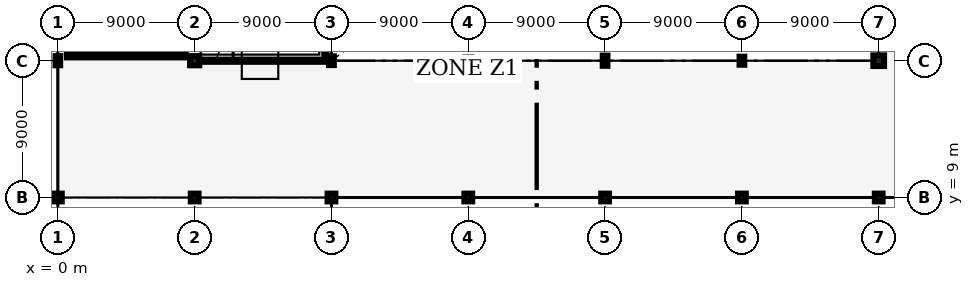
"""IFC4 building model, lengths in metres.
Left out: names, types, materials, properties, quantities, classifications, styles, units other than length and angle.
Written with IfcOpenShell. Run it as: python <this file> out.ifc"""

import sys

from ifc_helpers import new_model, si_unit, direction, frame, frame_2d, origin, origin_2d, place, context, subcontext, project, spatial, rectangle, hollow_circle, i_section, extrude, element, fill, save


model = new_model("IFC4")
c1 = context("Model", 3, precision=1e-05, world=origin(), true_north=direction((0.0, 1.0)))
c2 = subcontext(c1, "Body", "Model", "MODEL_VIEW")
j1 = project(units=[si_unit("LENGTHUNIT", "METRE"), si_unit("PLANEANGLEUNIT", "RADIAN")], contexts=[c1])
p1 = place(None, origin())
s1 = spatial("IfcSite", under=j1, at=p1, CompositionType="ELEMENT")
p2 = place(p1, origin())
s2 = spatial("IfcBuilding", under=s1, at=p2, CompositionType="ELEMENT")
p3 = place(p2, frame((0.0, 0.0, 6.0)))
s3 = spatial("IfcBuildingStorey", under=s2, at=p3, CompositionType="ELEMENT", Elevation=6.0)
p4 = place(p3, frame((0.0, 9.0, 0.0), z_axis=(0.0, 0.0, 1.0), x_axis=(1.0, 0.0, 0.0)))
e1 = element("IfcColumn", 1, at=p4, inside=s3, PredefinedType="COLUMN", context=c2, shape_type="SweptSolid", body=[
    extrude(hollow_circle(Radius=0.254, WallThickness=0.02, at=origin_2d()), origin(), (0.0, 0.0, 1.0), 6.0),
])
p5 = place(p3, frame((0.0, 18.0, 0.0), z_axis=(0.0, 0.0, 1.0), x_axis=(1.0, 0.0, 0.0)))
e2 = element("IfcColumn", 2, at=p5, inside=s3, PredefinedType="COLUMN", context=c2, shape_type="SweptSolid", body=[
    extrude(i_section(OverallWidth=0.3, OverallDepth=0.6, WebThickness=0.015, FlangeThickness=0.03, FilletRadius=0.027, at=origin_2d()), origin(), (0.0, 0.0, 1.0), 6.0),
])
p6 = place(p3, frame((9.0, 9.0, 0.0), z_axis=(0.0, 0.0, 1.0), x_axis=(1.0, 0.0, 0.0)))
e3 = element("IfcColumn", 3, at=p6, inside=s3, PredefinedType="COLUMN", context=c2, shape_type="SweptSolid", body=[
    extrude(hollow_circle(Radius=0.254, WallThickness=0.02, at=origin_2d()), origin(), (0.0, 0.0, 1.0), 6.0),
])
p7 = place(p3, frame((9.0, 18.0, 0.0), z_axis=(0.0, 0.0, 1.0), x_axis=(1.0, 0.0, 0.0)))
e4 = element("IfcColumn", 4, at=p7, inside=s3, PredefinedType="COLUMN", context=c2, shape_type="SweptSolid", body=[
    extrude(rectangle(XDim=0.6, YDim=0.6, at=origin_2d()), origin(), (0.0, 0.0, 1.0), 6.0),
])
p8 = place(p3, frame((18.0, 9.0, 0.0), z_axis=(0.0, 0.0, 1.0), x_axis=(1.0, 0.0, 0.0)))
e5 = element("IfcColumn", 5, at=p8, inside=s3, PredefinedType="COLUMN", context=c2, shape_type="SweptSolid", body=[
    extrude(hollow_circle(Radius=0.254, WallThickness=0.02, at=origin_2d()), origin(), (0.0, 0.0, 1.0), 6.0),
])
p9 = place(p3, frame((18.0, 18.0, 0.0), z_axis=(0.0, 0.0, 1.0), x_axis=(1.0, 0.0, 0.0)))
e6 = element("IfcColumn", 6, at=p9, inside=s3, PredefinedType="COLUMN", context=c2, shape_type="SweptSolid", body=[
    extrude(i_section(OverallWidth=0.306, OverallDepth=0.572, WebThickness=0.021, FlangeThickness=0.04, FilletRadius=0.027, at=origin_2d()), origin(), (0.0, 0.0, 1.0), 6.0),
])
p10 = place(p3, frame((27.0, 9.0, 0.0), z_axis=(0.0, 0.0, 1.0), x_axis=(1.0, 0.0, 0.0)))
e7 = element("IfcColumn", 7, at=p10, inside=s3, PredefinedType="COLUMN", context=c2, shape_type="SweptSolid", body=[
    extrude(hollow_circle(Radius=0.254, WallThickness=0.02, at=origin_2d()), origin(), (0.0, 0.0, 1.0), 6.0),
])
p11 = place(p3, frame((27.0, 18.0, 0.0), z_axis=(0.0, 0.0, 1.0), x_axis=(1.0, 0.0, 0.0)))
e8 = element("IfcColumn", 8, at=p11, inside=s3, PredefinedType="COLUMN", context=c2, shape_type="SweptSolid", body=[
    extrude(hollow_circle(Radius=0.203, WallThickness=0.016, at=origin_2d()), origin(), (0.0, 0.0, 1.0), 6.0),
])
p12 = place(p3, frame((36.0, 9.0, 0.0), z_axis=(0.0, 0.0, 1.0), x_axis=(1.0, 0.0, 0.0)))
e9 = element("IfcColumn", 9, at=p12, inside=s3, PredefinedType="COLUMN", context=c2, shape_type="SweptSolid", body=[
    extrude(hollow_circle(Radius=0.254, WallThickness=0.02, at=origin_2d()), origin(), (0.0, 0.0, 1.0), 6.0),
])
p13 = place(p3, frame((36.0, 18.0, 0.0), z_axis=(0.0, 0.0, 1.0), x_axis=(1.0, 0.0, 0.0)))
e10 = element("IfcColumn", 10, at=p13, inside=s3, PredefinedType="COLUMN", context=c2, shape_type="SweptSolid", body=[
    extrude(i_section(OverallWidth=0.305, OverallDepth=0.668, WebThickness=0.021, FlangeThickness=0.04, FilletRadius=0.027, at=origin_2d()), origin(), (0.0, 0.0, 1.0), 6.0),
])
p14 = place(p3, frame((45.0, 9.0, 0.0), z_axis=(0.0, 0.0, 1.0), x_axis=(1.0, 0.0, 0.0)))
e11 = element("IfcColumn", 11, at=p14, inside=s3, PredefinedType="COLUMN", context=c2, shape_type="SweptSolid", body=[
    extrude(hollow_circle(Radius=0.254, WallThickness=0.02, at=origin_2d()), origin(), (0.0, 0.0, 1.0), 6.0),
])
p15 = place(p3, frame((45.0, 18.0, 0.0), z_axis=(0.0, 0.0, 1.0), x_axis=(1.0, 0.0, 0.0)))
e12 = element("IfcColumn", 12, at=p15, inside=s3, PredefinedType="COLUMN", context=c2, shape_type="SweptSolid", body=[
    extrude(i_section(OverallWidth=0.306, OverallDepth=0.524, WebThickness=0.021, FlangeThickness=0.04, FilletRadius=0.027, at=origin_2d()), origin(), (0.0, 0.0, 1.0), 6.0),
])
p16 = place(p3, frame((54.0, 9.0, 0.0), z_axis=(0.0, 0.0, 1.0), x_axis=(1.0, 0.0, 0.0)))
e13 = element("IfcColumn", 13, at=p16, inside=s3, PredefinedType="COLUMN", context=c2, shape_type="SweptSolid", body=[
    extrude(hollow_circle(Radius=0.254, WallThickness=0.02, at=origin_2d()), origin(), (0.0, 0.0, 1.0), 6.0),
])
p17 = place(p3, frame((54.0, 18.0, 0.0), z_axis=(0.0, 0.0, 1.0), x_axis=(1.0, 0.0, 0.0)))
e14 = element("IfcColumn", 14, at=p17, inside=s3, PredefinedType="COLUMN", context=c2, shape_type="SweptSolid", body=[
    extrude(rectangle(XDim=0.7, YDim=0.7, at=origin_2d()), origin(), (0.0, 0.0, 1.0), 6.0),
])
p18 = place(p3, frame((0.725, 18.47, 0.0), z_axis=(0.0, 0.0, 1.0), x_axis=(0.0, 1.0, 0.0)))
e15 = element("IfcWall", 15, at=p18, inside=s3, PredefinedType="SHEAR", context=c2, shape_type="SweptSolid", body=[
    extrude(rectangle(XDim=8.06, YDim=0.25, at=frame_2d((4.03, 0.0))), origin(), (0.0, 0.0, 1.0), 5.7),
])
p19 = place(p3, frame((8.275, 18.47, 0.0), z_axis=(0.0, 0.0, 1.0), x_axis=(0.0, 1.0, 0.0)))
e16 = element("IfcWall", 16, at=p19, inside=s3, PredefinedType="SHEAR", context=c2, shape_type="SweptSolid", body=[
    extrude(rectangle(XDim=8.06, YDim=0.25, at=frame_2d((4.03, 0.0))), origin(), (0.0, 0.0, 1.0), 5.7),
])
p20 = place(p19, frame((1.15, 0.0, 0.0)))
e17 = element("IfcOpeningElement", 17, at=p20, cuts=e16, PredefinedType="OPENING", context=c2, shape_type="SweptSolid", body=[
    extrude(rectangle(XDim=1.6, YDim=2.2, at=frame_2d((0.8, 1.1))), frame((0.0, 0.135, 0.0), z_axis=(0.0, -1.0, 0.0), x_axis=(1.0, 0.0, 0.0)), (0.0, 0.0, 1.0), 0.27),
])
p21 = place(p3, frame((0.6, 18.345, 0.0), z_axis=(0.0, 0.0, 1.0), x_axis=(1.0, 0.0, 0.0)))
e18 = element("IfcWall", 18, at=p21, inside=s3, PredefinedType="SHEAR", context=c2, shape_type="SweptSolid", body=[
    extrude(rectangle(XDim=7.8, YDim=0.25, at=frame_2d((3.9, 0.0))), origin(), (0.0, 0.0, 1.0), 5.7),
])
p22 = place(p3, frame((4.415, 18.47, 0.0), z_axis=(0.0, 0.0, 1.0), x_axis=(0.0, 1.0, 0.0)))
e19 = element("IfcWall", 19, at=p22, inside=s3, PredefinedType="SHEAR", context=c2, shape_type="SweptSolid", body=[
    extrude(rectangle(XDim=8.06, YDim=0.25, at=frame_2d((4.03, 0.0))), origin(), (0.0, 0.0, 1.0), 5.7),
])
p23 = place(p22, frame((0.25, 0.0, 0.0)))
e20 = element("IfcOpeningElement", 20, at=p23, cuts=e19, PredefinedType="OPENING", context=c2, shape_type="SweptSolid", body=[
    extrude(rectangle(XDim=1.15, YDim=2.15, at=frame_2d((0.575, 1.075))), frame((0.0, 0.135, 0.0), z_axis=(0.0, -1.0, 0.0), x_axis=(1.0, 0.0, 0.0)), (0.0, 0.0, 1.0), 0.27),
])
p24 = place(p3, frame((9.0, 18.0, 0.0), z_axis=(0.0, 0.0, 1.0), x_axis=(1.0, 0.0, 0.0)))
e21 = element("IfcWall", 21, at=p24, inside=s3, PredefinedType="PARTITIONING", context=c2, shape_type="SweptSolid", body=[
    extrude(rectangle(XDim=8.6, YDim=0.14, at=frame_2d((4.3, 0.0))), origin(), (0.0, 0.0, 1.0), 4.85),
])
p25 = place(p24, frame((1.45, 0.0, 0.0)))
e22 = element("IfcOpeningElement", 22, at=p25, cuts=e21, PredefinedType="OPENING", context=c2, shape_type="SweptSolid", body=[
    extrude(rectangle(XDim=1.08, YDim=2.18, at=frame_2d((0.54, 1.09))), frame((0.0, 0.08, 0.0), z_axis=(0.0, -1.0, 0.0), x_axis=(1.0, 0.0, 0.0)), (0.0, 0.0, 1.0), 0.16),
])
p26 = place(p3, frame((17.6, 18.084, 0.0), z_axis=(0.0, 0.0, 1.0), x_axis=(0.0, 1.0, 0.0)))
e23 = element("IfcWall", 23, at=p26, inside=s3, PredefinedType="PARTITIONING", context=c2, shape_type="SweptSolid", body=[
    extrude(rectangle(XDim=17.432, YDim=0.14, at=frame_2d((8.716, 0.0))), origin(), (0.0, 0.0, 1.0), 4.85),
])
p27 = place(p25, origin())
e24 = element("IfcDoor", 24, at=p27, inside=s3, OperationType="SINGLE_SWING_RIGHT", PredefinedType="DOOR", context=c2, shape_type="SweptSolid", body=[
    extrude(rectangle(XDim=1.08, YDim=2.18, at=frame_2d((0.54, 1.09))), frame((0.0, 0.025, 0.0), z_axis=(0.0, -1.0, 0.0), x_axis=(1.0, 0.0, 0.0)), (0.0, 0.0, 1.0), 0.05),
])
fill(e22, e24)
save(model, sys.argv[1])
